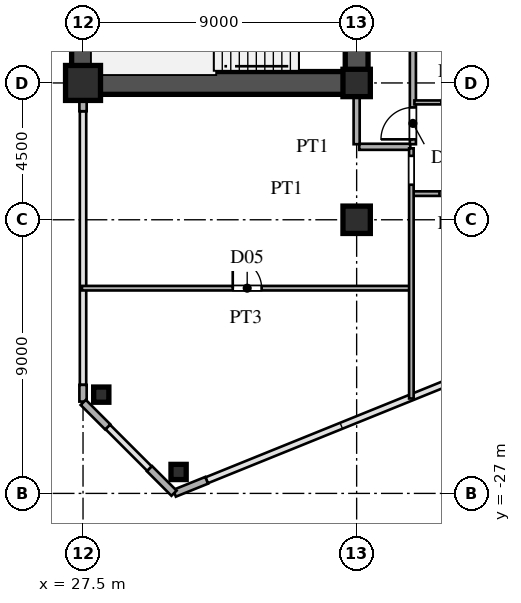
"""IFC4 building model, lengths in metres.
Left out: names, types, materials, properties, quantities, classifications, styles, units other than length and angle.
Written with IfcOpenShell. Run it as: python <this file> out.ifc"""

import sys

from ifc_helpers import new_model, si_unit, direction, frame, frame_2d, origin, origin_2d, place, context, subcontext, project, spatial, rectangle, hollow_rectangle, i_section, extrude, source, transform, mapped, element, fill, save


model = new_model("IFC4")
c1 = context("Model", 3, precision=1e-05, world=origin(), true_north=direction((0.0, 1.0)))
c2 = subcontext(c1, "Body", "Model", "MODEL_VIEW")
j1 = project(units=[si_unit("LENGTHUNIT", "METRE"), si_unit("PLANEANGLEUNIT", "RADIAN")], contexts=[c1])
p1 = place(None, origin())
s1 = spatial("IfcSite", under=j1, at=p1, CompositionType="ELEMENT")
p2 = place(p1, origin())
s2 = spatial("IfcBuilding", under=s1, at=p2, CompositionType="ELEMENT")
p3 = place(p2, frame((0.0, 0.0, 40.5)))
s3 = spatial("IfcBuildingStorey", under=s2, at=p3, CompositionType="ELEMENT", Elevation=40.5)
m1 = source(origin(), c2, "Body", "SweptSolid", [
    extrude(hollow_rectangle(XDim=1.15, YDim=1.15, WallThickness=0.048, at=origin_2d()), origin(), (0.0, 0.0, 1.0), 3.6),
])
p4 = place(p3, frame((27.5, -13.5, 0.0), z_axis=(0.0, 0.0, 1.0), x_axis=(1.0, 0.0, 0.0)))
e1 = element("IfcColumn", 1, at=p4, inside=s3, PredefinedType="COLUMN", context=c2, shape_type="MappedRepresentation", body=[
    mapped(m1, transform((0.0, 0.0, 0.0), scale=1.0)),
])
m2 = source(origin(), c2, "Body", "SweptSolid", [
    extrude(i_section(OverallWidth=0.9, OverallDepth=0.9, WebThickness=0.036, FlangeThickness=0.055, at=origin_2d()), origin(), (0.0, 0.0, 1.0), 3.6),
])
for number, where, z_axis, x_axis in (
    (2, (36.5, -18.0, 0.0), (0.0, 0.0, 1.0), (1.0, 0.0, 0.0)),
    (3, (36.5, -13.5, 0.0), (0.0, 0.0, 1.0), (1.0, 0.0, 0.0)),
):
    element("IfcColumn", number, at=place(p3, frame(where, z_axis=z_axis, x_axis=x_axis)), inside=s3, PredefinedType="COLUMN", context=c2, shape_type="MappedRepresentation", body=[
        mapped(m2, transform((0.0, 0.0, 0.0), scale=1.0)),
    ])
m3 = source(origin(), c2, "Body", "SweptSolid", [
    extrude(hollow_rectangle(XDim=0.5, YDim=0.5, WallThickness=0.02, at=origin_2d()), origin(), (0.0, 0.0, 1.0), 3.6),
])
for number, where, z_axis, x_axis in (
    (4, (30.643, -26.295, 0.0), (0.0, 0.0, 1.0), (1.0, 0.0, 0.0)),
    (5, (28.1, -23.751, 0.0), (0.0, 0.0, 1.0), (1.0, 0.0, 0.0)),
):
    element("IfcColumn", number, at=place(p3, frame(where, z_axis=z_axis, x_axis=x_axis)), inside=s3, PredefinedType="COLUMN", context=c2, shape_type="MappedRepresentation", body=[
        mapped(m3, transform((0.0, 0.0, 0.0), scale=1.0)),
    ])
p5 = place(p3, frame((30.509, -26.996, 0.0), z_axis=(0.0, 0.0, 1.0), x_axis=(0.927007103665, 0.375043770452, 0.0)))
e6 = element("IfcWall", 6, at=p5, inside=s3, PredefinedType="SOLIDWALL", context=c2, shape_type="SweptSolid", body=[
    extrude(rectangle(XDim=1.14, YDim=0.24, at=frame_2d((0.57, 0.0))), origin(), (0.0, 0.0, 1.0), 3.38),
])
p6 = place(p3, frame((27.5, -23.98, 0.0), z_axis=(0.0, 0.0, 1.0), x_axis=(0.0, 1.0, 0.0)))
e7 = element("IfcWall", 7, at=p6, inside=s3, PredefinedType="SOLIDWALL", context=c2, shape_type="SweptSolid", body=[
    extrude(rectangle(XDim=0.55, YDim=0.24, at=frame_2d((0.275, 0.0))), origin(), (0.0, 0.0, 1.0), 3.38),
])
p7 = place(p3, frame((27.5, -14.43, 0.0), z_axis=(0.0, 0.0, 1.0), x_axis=(0.0, 1.0, 0.0)))
e8 = element("IfcWall", 8, at=p7, inside=s3, PredefinedType="SOLIDWALL", context=c2, shape_type="SweptSolid", body=[
    extrude(rectangle(XDim=0.55, YDim=0.24, at=frame_2d((0.275, 0.0))), origin(), (0.0, 0.0, 1.0), 2.88),
])
for number, where, z_axis, x_axis in (
    (9, (27.507, -24.007, 0.0), (0.0, 0.0, 1.0), (0.707, -0.707, 0.0)),
    (10, (29.687, -26.187, 0.0), (0.0, 0.0, 1.0), (0.707, -0.707, 0.0)),
):
    element("IfcWall", number, at=place(p3, frame(where, z_axis=z_axis, x_axis=x_axis)), inside=s3, PredefinedType="SOLIDWALL", context=c2, shape_type="SweptSolid", body=[
        extrude(rectangle(XDim=1.14, YDim=0.24, at=frame_2d((0.57, 0.0))), origin(), (0.0, 0.0, 1.0), 3.38),
    ])
p8 = place(p3, frame((27.5, -13.5, 0.0), z_axis=(0.0, 0.0, 1.0), x_axis=(0.0, 1.0, 0.0)))
e11 = element("IfcWall", 11, at=p8, inside=s3, PredefinedType="SHEAR", context=c2, shape_type="SweptSolid", body=[
    extrude(rectangle(XDim=12.2, YDim=0.75, at=frame_2d((6.1, 0.0))), origin(), (0.0, 0.0, 1.0), 3.38),
])
p9 = place(p3, frame((27.5, -13.5, 0.0), z_axis=(0.0, 0.0, 1.0), x_axis=(1.0, 0.0, 0.0)))
e12 = element("IfcWall", 12, at=p9, inside=s3, PredefinedType="SHEAR", context=c2, shape_type="SweptSolid", body=[
    extrude(rectangle(XDim=9.0, YDim=0.75, at=frame_2d((4.5, 0.0))), origin(), (0.0, 0.0, 1.0), 3.38),
])
p10 = place(p3, frame((36.5, -13.65, 0.0), z_axis=(0.0, 0.0, 1.0), x_axis=(0.0, 1.0, 0.0)))
e13 = element("IfcWall", 13, at=p10, inside=s3, PredefinedType="SHEAR", context=c2, shape_type="SweptSolid", body=[
    extrude(rectangle(XDim=7.15, YDim=0.75, at=frame_2d((3.575, 0.0))), origin(), (0.0, 0.0, 1.0), 3.38),
])
p11 = place(p10, frame((4.675, 0.0, 0.0)))
e14 = element("IfcOpeningElement", 14, at=p11, cuts=e13, PredefinedType="OPENING", context=c2, shape_type="SweptSolid", body=[
    extrude(rectangle(XDim=1.15, YDim=2.2, at=frame_2d((0.575, 1.1))), frame((0.0, 0.385, 0.0), z_axis=(0.0, -1.0, 0.0), x_axis=(1.0, 0.0, 0.0)), (0.0, 0.0, 1.0), 0.77),
])
p12 = place(p3, frame((27.465, -20.25, 0.0), z_axis=(0.0, 0.0, 1.0), x_axis=(1.0, 0.0, 0.0)))
e15 = element("IfcWall", 15, at=p12, inside=s3, PredefinedType="PARTITIONING", context=c2, shape_type="SweptSolid", body=[
    extrude(rectangle(XDim=10.785, YDim=0.15, at=frame_2d((5.393, 0.0))), origin(), (0.0, 0.0, 1.0), 3.38),
])
p13 = place(p12, frame((4.96, 0.0, 0.0)))
e16 = element("IfcOpeningElement", 16, at=p13, cuts=e15, PredefinedType="OPENING", context=c2, shape_type="SweptSolid", body=[
    extrude(rectangle(XDim=0.95, YDim=2.15, at=frame_2d((0.475, 1.075))), frame((0.0, 0.085, 0.0), z_axis=(0.0, -1.0, 0.0), x_axis=(1.0, 0.0, 0.0)), (0.0, 0.0, 1.0), 0.17),
])
p14 = place(p3, frame((38.35, -17.14, 0.0), z_axis=(0.0, 0.0, 1.0), x_axis=(1.0, 0.0, 0.0)))
e17 = element("IfcWall", 17, at=p14, inside=s3, PredefinedType="PARTITIONING", context=c2, shape_type="SweptSolid", body=[
    extrude(rectangle(XDim=2.7, YDim=0.15, at=frame_2d((1.35, 0.0))), origin(), (0.0, 0.0, 1.0), 3.38),
])
p15 = place(p14, frame((0.875, 0.0, 0.0)))
e18 = element("IfcOpeningElement", 18, at=p15, cuts=e17, PredefinedType="OPENING", context=c2, shape_type="SweptSolid", body=[
    extrude(rectangle(XDim=0.95, YDim=2.15, at=frame_2d((0.475, 1.075))), frame((0.0, 0.085, 0.0), z_axis=(0.0, -1.0, 0.0), x_axis=(1.0, 0.0, 0.0)), (0.0, 0.0, 1.0), 0.17),
])
p16 = place(p3, frame((36.585, -15.6, 0.0), z_axis=(0.0, 0.0, 1.0), x_axis=(1.0, 0.0, 0.0)))
e19 = element("IfcWall", 19, at=p16, inside=s3, PredefinedType="PARTITIONING", context=c2, shape_type="SweptSolid", body=[
    extrude(rectangle(XDim=1.68, YDim=0.2, at=frame_2d((0.84, 0.0))), origin(), (0.0, 0.0, 1.0), 3.38),
])
p17 = place(p3, frame((38.4, -14.14, 0.0), z_axis=(0.0, 0.0, 1.0), x_axis=(1.0, 0.0, 0.0)))
e20 = element("IfcWall", 20, at=p17, inside=s3, PredefinedType="PARTITIONING", context=c2, shape_type="SweptSolid", body=[
    extrude(rectangle(XDim=2.65, YDim=0.13, at=frame_2d((1.325, 0.0))), origin(), (0.0, 0.0, 1.0), 3.38),
])
p18 = place(p17, frame((0.885, 0.0, 0.0)))
e21 = element("IfcOpeningElement", 21, at=p18, cuts=e20, PredefinedType="OPENING", context=c2, shape_type="SweptSolid", body=[
    extrude(rectangle(XDim=0.88, YDim=2.1, at=frame_2d((0.44, 1.05))), frame((0.0, 0.075, 0.0), z_axis=(0.0, -1.0, 0.0), x_axis=(1.0, 0.0, 0.0)), (0.0, 0.0, 1.0), 0.15),
])
p19 = place(p3, frame((36.5, -15.515, 0.0), z_axis=(0.0, 0.0, 1.0), x_axis=(0.0, 1.0, 0.0)))
e22 = element("IfcWall", 22, at=p19, inside=s3, PredefinedType="PARTITIONING", context=c2, shape_type="SweptSolid", body=[
    extrude(rectangle(XDim=1.635, YDim=0.2, at=frame_2d((0.817, 0.0))), origin(), (0.0, 0.0, 1.0), 2.68),
])
p20 = place(p3, frame((38.3, -23.878, 0.0), z_axis=(0.0, 0.0, 1.0), x_axis=(0.0, 1.0, 0.0)))
e23 = element("IfcWall", 23, at=p20, inside=s3, PredefinedType="PARTITIONING", context=c2, shape_type="SweptSolid", body=[
    extrude(rectangle(XDim=8.228, YDim=0.15, at=frame_2d((4.114, 0.0))), origin(), (0.0, 0.0, 1.0), 3.38),
])
p21 = place(p20, frame((7.031, 0.0, 0.0)))
e24 = element("IfcOpeningElement", 24, at=p21, cuts=e23, PredefinedType="OPENING", context=c2, shape_type="SweptSolid", body=[
    extrude(rectangle(XDim=0.95, YDim=2.15, at=frame_2d((0.475, 1.075))), frame((0.0, 0.085, 0.0), z_axis=(0.0, -1.0, 0.0), x_axis=(1.0, 0.0, 0.0)), (0.0, 0.0, 1.0), 0.17),
])
p22 = place(p3, frame((38.35, -15.515, 0.0), z_axis=(0.0, 0.0, 1.0), x_axis=(0.0, 1.0, 0.0)))
e25 = element("IfcWall", 25, at=p22, inside=s3, PredefinedType="PARTITIONING", context=c2, shape_type="SweptSolid", body=[
    extrude(rectangle(XDim=31.03, YDim=0.2, at=frame_2d((15.515, 0.0))), origin(), (0.0, 0.0, 1.0), 3.38),
])
p23 = place(p22, frame((0.16, 0.0, 0.0)))
e26 = element("IfcOpeningElement", 26, at=p23, cuts=e25, PredefinedType="OPENING", context=c2, shape_type="SweptSolid", body=[
    extrude(rectangle(XDim=1.05, YDim=2.25, at=frame_2d((0.525, 1.125))), frame((0.0, 0.11, 0.0), z_axis=(0.0, -1.0, 0.0), x_axis=(1.0, 0.0, 0.0)), (0.0, 0.0, 1.0), 0.22),
])
p24 = place(p22, frame((9.067, 0.0, 0.0)))
e27 = element("IfcOpeningElement", 27, at=p24, cuts=e25, PredefinedType="OPENING", context=c2, shape_type="SweptSolid", body=[
    extrude(rectangle(XDim=1.05, YDim=2.25, at=frame_2d((0.525, 1.125))), frame((0.0, 0.11, 0.0), z_axis=(0.0, -1.0, 0.0), x_axis=(1.0, 0.0, 0.0)), (0.0, 0.0, 1.0), 0.22),
])
p25 = place(p22, frame((20.567, 0.0, 0.0)))
e28 = element("IfcOpeningElement", 28, at=p25, cuts=e25, PredefinedType="OPENING", context=c2, shape_type="SweptSolid", body=[
    extrude(rectangle(XDim=1.05, YDim=2.25, at=frame_2d((0.525, 1.125))), frame((0.0, 0.11, 0.0), z_axis=(0.0, -1.0, 0.0), x_axis=(1.0, 0.0, 0.0)), (0.0, 0.0, 1.0), 0.22),
])
p26 = place(p22, frame((29.82, 0.0, 0.0)))
e29 = element("IfcOpeningElement", 29, at=p26, cuts=e25, PredefinedType="OPENING", context=c2, shape_type="SweptSolid", body=[
    extrude(rectangle(XDim=1.05, YDim=2.25, at=frame_2d((0.525, 1.125))), frame((0.0, 0.11, 0.0), z_axis=(0.0, -1.0, 0.0), x_axis=(1.0, 0.0, 0.0)), (0.0, 0.0, 1.0), 0.22),
])
m4 = source(origin(), c2, "Body", "SweptSolid", [
    extrude(rectangle(XDim=0.95, YDim=2.15, at=frame_2d((0.475, 1.075))), frame((0.0, 0.025, 0.0), z_axis=(0.0, -1.0, 0.0), x_axis=(1.0, 0.0, 0.0)), (0.0, 0.0, 1.0), 0.05),
])
p27 = place(p13, origin())
e30 = element("IfcDoor", 30, at=p27, inside=s3, OperationType="SINGLE_SWING_LEFT", PredefinedType="DOOR", context=c2, shape_type="MappedRepresentation", body=[
    mapped(m4, transform((0.0, 0.0, 0.0), scale=1.0)),
])
fill(e16, e30)
m5 = source(origin(), c2, "Body", "SweptSolid", [
    extrude(rectangle(XDim=0.88, YDim=2.1, at=frame_2d((0.44, 1.05))), frame((0.0, 0.025, 0.0), z_axis=(0.0, -1.0, 0.0), x_axis=(1.0, 0.0, 0.0)), (0.0, 0.0, 1.0), 0.05),
])
p28 = place(p18, origin())
e31 = element("IfcDoor", 31, at=p28, inside=s3, OperationType="SINGLE_SWING_RIGHT", PredefinedType="DOOR", context=c2, shape_type="MappedRepresentation", body=[
    mapped(m5, transform((0.0, 0.0, 0.0), scale=1.0)),
])
fill(e21, e31)
m6 = source(origin(), c2, "Body", "SweptSolid", [
    extrude(rectangle(XDim=1.05, YDim=2.25, at=frame_2d((0.525, 1.125))), frame((0.0, 0.025, 0.0), z_axis=(0.0, -1.0, 0.0), x_axis=(1.0, 0.0, 0.0)), (0.0, 0.0, 1.0), 0.05),
])
p29 = place(p23, origin())
e32 = element("IfcDoor", 32, at=p29, inside=s3, OperationType="SINGLE_SWING_LEFT", PredefinedType="DOOR", context=c2, shape_type="MappedRepresentation", body=[
    mapped(m6, transform((0.0, 0.0, 0.0), scale=1.0)),
])
fill(e26, e32)
save(model, sys.argv[1])
